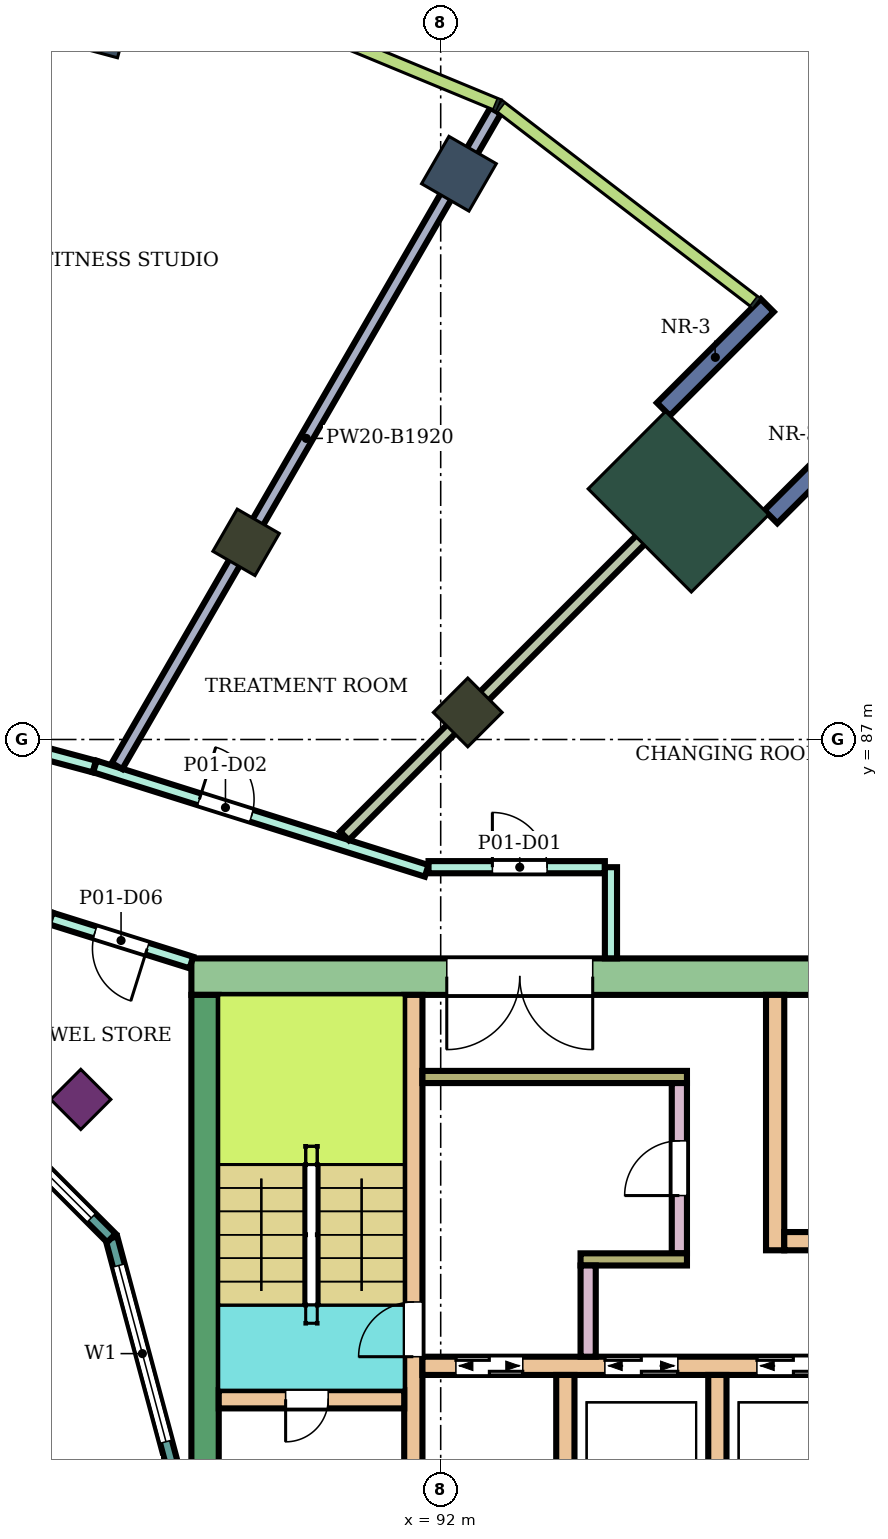
"""IFC4 building model, lengths in metres.
Left out: names, types, materials, properties, quantities, classifications, styles, units other than length and angle.
Written with IfcOpenShell. Run it as: python <this file> out.ifc"""

import sys

from ifc_helpers import new_model, si_unit, direction, frame, frame_2d, origin, origin_2d, place, context, subcontext, project, spatial, rectangle, extrude, element, fill, save


model = new_model("IFC4")
c1 = context("Model", 3, precision=1e-05, world=origin(), true_north=direction((0.0, 1.0)))
c2 = subcontext(c1, "Body", "Model", "MODEL_VIEW")
j1 = project(units=[si_unit("LENGTHUNIT", "METRE"), si_unit("PLANEANGLEUNIT", "RADIAN")], contexts=[c1])
p1 = place(None, origin())
s1 = spatial("IfcSite", under=j1, at=p1, CompositionType="ELEMENT")
p2 = place(p1, origin())
s2 = spatial("IfcBuilding", under=s1, at=p2, CompositionType="ELEMENT")
p3 = place(p2, frame((0.0, 0.0, 270.9)))
s3 = spatial("IfcBuildingStorey", under=s2, at=p3, CompositionType="ELEMENT", Elevation=270.9)
for number, where, z_axis, x_axis in (
    (1, (92.3, 96.304, 0.0), (0.0, 0.0, 1.0), (0.5, 0.866, 0.0)),
    (2, (86.367, 98.762, 0.0), (0.0, 0.0, 1.0), (0.259, 0.966, 0.0)),
):
    element("IfcColumn", number, at=place(p3, frame(where, z_axis=z_axis, x_axis=x_axis)), inside=s3, PredefinedType="COLUMN", context=c2, shape_type="SweptSolid", body=[
        extrude(rectangle(XDim=0.9, YDim=0.9, at=origin_2d()), origin(), (0.0, 0.0, 1.0), 4.8),
    ])
for number, where, z_axis, x_axis in (
    (3, (92.445, 87.445, 0.0), (0.0, 0.0, 1.0), (0.707, 0.707, 0.0)),
    (4, (88.8, 90.242, 0.0), (0.0, 0.0, 1.0), (0.5, 0.866, 0.0)),
):
    element("IfcColumn", number, at=place(p3, frame(where, z_axis=z_axis, x_axis=x_axis)), inside=s3, PredefinedType="COLUMN", context=c2, shape_type="SweptSolid", body=[
        extrude(rectangle(XDim=0.8, YDim=0.8, at=origin_2d()), origin(), (0.0, 0.0, 1.0), 4.8),
    ])
p4 = place(p3, frame((86.081, 81.081, 0.0), z_axis=(0.0, 0.0, 1.0), x_axis=(0.707106781187, 0.707106781187, 0.0)))
e5 = element("IfcColumn", 5, at=p4, inside=s3, PredefinedType="COLUMN", context=c2, shape_type="SweptSolid", body=[
    extrude(rectangle(XDim=0.7, YDim=0.7, at=origin_2d()), origin(), (0.0, 0.0, 1.0), 4.8),
])
p5 = place(p3, frame((95.91, 90.91, 0.0), z_axis=(0.0, 0.0, 1.0), x_axis=(0.707106781187, 0.707106781187, 0.0)))
e6 = element("IfcColumn", 6, at=p5, inside=s3, PredefinedType="COLUMN", context=c2, shape_type="SweptSolid", body=[
    extrude(rectangle(XDim=1.8, YDim=2.4, at=origin_2d()), origin(), (0.0, 0.0, 1.0), 4.8),
])
p6 = place(p3, frame((87.9, 83.1, 0.0), z_axis=(0.0, 0.0, 1.0), x_axis=(1.0, 0.0, 0.0)))
e7 = element("IfcWall", 7, at=p6, inside=s3, PredefinedType="SHEAR", context=c2, shape_type="SweptSolid", body=[
    extrude(rectangle(XDim=14.9, YDim=0.6, at=frame_2d((7.45, 0.0))), origin(), (0.0, 0.0, 1.0), 4.48),
])
p7 = place(p6, frame((4.2, 0.0, 0.0)))
e8 = element("IfcOpeningElement", 8, at=p7, cuts=e7, PredefinedType="OPENING", context=c2, shape_type="SweptSolid", body=[
    extrude(rectangle(XDim=2.4, YDim=2.4, at=frame_2d((1.2, 1.2))), frame((0.0, 0.31, 0.0), z_axis=(0.0, -1.0, 0.0), x_axis=(1.0, 0.0, 0.0)), (0.0, 0.0, 1.0), 0.62),
])
p8 = place(p3, frame((88.125, 75.0, 0.0), z_axis=(0.0, 0.0, 1.0), x_axis=(0.0, 1.0, 0.0)))
e9 = element("IfcWall", 9, at=p8, inside=s3, PredefinedType="SHEAR", context=c2, shape_type="SweptSolid", body=[
    extrude(rectangle(XDim=7.8, YDim=0.45, at=frame_2d((3.9, 0.0))), origin(), (0.0, 0.0, 1.0), 4.48),
])
p9 = place(p3, frame((91.55, 75.0, 0.0), z_axis=(0.0, 0.0, 1.0), x_axis=(0.0, 1.0, 0.0)))
e10 = element("IfcWall", 10, at=p9, inside=s3, PredefinedType="SHEAR", context=c2, shape_type="SweptSolid", body=[
    extrude(rectangle(XDim=7.8, YDim=0.3, at=frame_2d((3.9, 0.0))), origin(), (0.0, 0.0, 1.0), 4.48),
])
p10 = place(p9, frame((1.85, 0.0, 0.0)))
e11 = element("IfcOpeningElement", 11, at=p10, cuts=e10, PredefinedType="OPENING", context=c2, shape_type="SweptSolid", body=[
    extrude(rectangle(XDim=0.9, YDim=2.1, at=frame_2d((0.45, 1.05))), frame((0.0, 0.16, 0.0), z_axis=(0.0, -1.0, 0.0), x_axis=(1.0, 0.0, 0.0)), (0.0, 0.0, 1.0), 0.32),
])
p11 = place(p3, frame((88.35, 76.15, 0.0), z_axis=(0.0, 0.0, 1.0), x_axis=(1.0, 0.0, 0.0)))
e12 = element("IfcWall", 12, at=p11, inside=s3, PredefinedType="SHEAR", context=c2, shape_type="SweptSolid", body=[
    extrude(rectangle(XDim=3.05, YDim=0.3, at=frame_2d((1.525, 0.0))), origin(), (0.0, 0.0, 1.0), 4.48),
])
p12 = place(p11, frame((1.1, 0.0, 0.0)))
e13 = element("IfcOpeningElement", 13, at=p12, cuts=e12, PredefinedType="OPENING", context=c2, shape_type="SweptSolid", body=[
    extrude(rectangle(XDim=0.7, YDim=2.0, at=frame_2d((0.35, 1.0))), frame((0.0, 0.16, 0.0), z_axis=(0.0, -1.0, 0.0), x_axis=(1.0, 0.0, 0.0)), (0.0, 0.0, 1.0), 0.32),
])
p13 = place(p3, frame((91.7, 76.7, 0.0), z_axis=(0.0, 0.0, 1.0), x_axis=(1.0, 0.0, 0.0)))
e14 = element("IfcWall", 14, at=p13, inside=s3, PredefinedType="SHEAR", context=c2, shape_type="SweptSolid", body=[
    extrude(rectangle(XDim=11.1, YDim=0.3, at=frame_2d((5.55, 0.0))), origin(), (0.0, 0.0, 1.0), 4.48),
])
p14 = place(p13, frame((0.55, 0.0, 0.0)))
e15 = element("IfcOpeningElement", 15, at=p14, cuts=e14, PredefinedType="OPENING", context=c2, shape_type="SweptSolid", body=[
    extrude(rectangle(XDim=1.1, YDim=2.1, at=frame_2d((0.55, 1.05))), frame((0.0, 0.16, 0.0), z_axis=(0.0, -1.0, 0.0), x_axis=(1.0, 0.0, 0.0)), (0.0, 0.0, 1.0), 0.32),
])
p15 = place(p13, frame((3.0, 0.0, 0.0)))
e16 = element("IfcOpeningElement", 16, at=p15, cuts=e14, PredefinedType="OPENING", context=c2, shape_type="SweptSolid", body=[
    extrude(rectangle(XDim=1.2, YDim=2.1, at=frame_2d((0.6, 1.05))), frame((0.0, 0.16, 0.0), z_axis=(0.0, -1.0, 0.0), x_axis=(1.0, 0.0, 0.0)), (0.0, 0.0, 1.0), 0.32),
])
p16 = place(p13, frame((5.5, 0.0, 0.0)))
e17 = element("IfcOpeningElement", 17, at=p16, cuts=e14, PredefinedType="OPENING", context=c2, shape_type="SweptSolid", body=[
    extrude(rectangle(XDim=1.2, YDim=2.1, at=frame_2d((0.6, 1.05))), frame((0.0, 0.16, 0.0), z_axis=(0.0, -1.0, 0.0), x_axis=(1.0, 0.0, 0.0)), (0.0, 0.0, 1.0), 0.32),
])
p17 = place(p13, frame((8.85, 0.0, 0.0)))
e18 = element("IfcOpeningElement", 18, at=p17, cuts=e14, PredefinedType="OPENING", context=c2, shape_type="SweptSolid", body=[
    extrude(rectangle(XDim=0.9, YDim=2.1, at=frame_2d((0.45, 1.05))), frame((0.0, 0.16, 0.0), z_axis=(0.0, -1.0, 0.0), x_axis=(1.0, 0.0, 0.0)), (0.0, 0.0, 1.0), 0.32),
])
for number, where, z_axis, x_axis in (
    (19, (94.05, 74.0, 0.0), (0.0, 0.0, 1.0), (0.0, 1.0, 0.0)),
    (20, (96.55, 74.0, 0.0), (0.0, 0.0, 1.0), (0.0, 1.0, 0.0)),
):
    element("IfcWall", number, at=place(p3, frame(where, z_axis=z_axis, x_axis=x_axis)), inside=s3, PredefinedType="SHEAR", context=c2, shape_type="SweptSolid", body=[
        extrude(rectangle(XDim=2.55, YDim=0.3, at=frame_2d((1.275, 0.0))), origin(), (0.0, 0.0, 1.0), 4.48),
    ])
p18 = place(p3, frame((91.7, 81.45, 0.0), z_axis=(0.0, 0.0, 1.0), x_axis=(1.0, 0.0, 0.0)))
e21 = element("IfcWall", 21, at=p18, inside=s3, PredefinedType="SHEAR", context=c2, shape_type="SweptSolid", body=[
    extrude(rectangle(XDim=4.35, YDim=0.2, at=frame_2d((2.175, 0.0))), origin(), (0.0, 0.0, 1.0), 4.48),
])
p19 = place(p3, frame((95.925, 78.55, 0.0), z_axis=(0.0, 0.0, 1.0), x_axis=(0.0, 1.0, 0.0)))
e22 = element("IfcWall", 22, at=p19, inside=s3, PredefinedType="SHEAR", context=c2, shape_type="SweptSolid", body=[
    extrude(rectangle(XDim=2.8, YDim=0.25, at=frame_2d((1.4, 0.0))), origin(), (0.0, 0.0, 1.0), 4.48),
])
p20 = place(p19, frame((0.95, 0.0, 0.0)))
e23 = element("IfcOpeningElement", 23, at=p20, cuts=e22, PredefinedType="OPENING", context=c2, shape_type="SweptSolid", body=[
    extrude(rectangle(XDim=0.9, YDim=2.1, at=frame_2d((0.45, 1.05))), frame((0.0, 0.135, 0.0), z_axis=(0.0, -1.0, 0.0), x_axis=(1.0, 0.0, 0.0)), (0.0, 0.0, 1.0), 0.27),
])
p21 = place(p3, frame((94.3, 78.45, 0.0), z_axis=(0.0, 0.0, 1.0), x_axis=(1.0, 0.0, 0.0)))
e24 = element("IfcWall", 24, at=p21, inside=s3, PredefinedType="SHEAR", context=c2, shape_type="SweptSolid", body=[
    extrude(rectangle(XDim=1.75, YDim=0.2, at=frame_2d((0.875, 0.0))), origin(), (0.0, 0.0, 1.0), 4.48),
])
p22 = place(p3, frame((94.425, 76.85, 0.0), z_axis=(0.0, 0.0, 1.0), x_axis=(0.0, 1.0, 0.0)))
e25 = element("IfcWall", 25, at=p22, inside=s3, PredefinedType="SHEAR", context=c2, shape_type="SweptSolid", body=[
    extrude(rectangle(XDim=1.5, YDim=0.25, at=frame_2d((0.75, 0.0))), origin(), (0.0, 0.0, 1.0), 4.48),
])
p23 = place(p3, frame((97.5, 78.6, 0.0), z_axis=(0.0, 0.0, 1.0), x_axis=(0.0, 1.0, 0.0)))
e26 = element("IfcWall", 26, at=p23, inside=s3, PredefinedType="SHEAR", context=c2, shape_type="SweptSolid", body=[
    extrude(rectangle(XDim=4.2, YDim=0.3, at=frame_2d((2.1, 0.0))), origin(), (0.0, 0.0, 1.0), 4.48),
])
p24 = place(p3, frame((97.65, 78.75, 0.0), z_axis=(0.0, 0.0, 1.0), x_axis=(1.0, 0.0, 0.0)))
e27 = element("IfcWall", 27, at=p24, inside=s3, PredefinedType="SHEAR", context=c2, shape_type="SweptSolid", body=[
    extrude(rectangle(XDim=5.15, YDim=0.3, at=frame_2d((2.575, 0.0))), origin(), (0.0, 0.0, 1.0), 4.48),
])
p25 = place(p24, frame((0.58, 0.0, 0.0)))
e28 = element("IfcOpeningElement", 28, at=p25, cuts=e27, PredefinedType="OPENING", context=c2, shape_type="SweptSolid", body=[
    extrude(rectangle(XDim=0.9, YDim=2.1, at=frame_2d((0.45, 1.05))), frame((0.0, 0.16, 0.0), z_axis=(0.0, -1.0, 0.0), x_axis=(1.0, 0.0, 0.0)), (0.0, 0.0, 1.0), 0.32),
])
p26 = place(p24, frame((2.383, 0.0, 0.0)))
e29 = element("IfcOpeningElement", 29, at=p26, cuts=e27, PredefinedType="OPENING", context=c2, shape_type="SweptSolid", body=[
    extrude(rectangle(XDim=0.9, YDim=2.1, at=frame_2d((0.45, 1.05))), frame((0.0, 0.16, 0.0), z_axis=(0.0, -1.0, 0.0), x_axis=(1.0, 0.0, 0.0)), (0.0, 0.0, 1.0), 0.32),
])
p27 = place(p24, frame((3.927, 0.0, 0.0)))
e30 = element("IfcOpeningElement", 30, at=p27, cuts=e27, PredefinedType="OPENING", context=c2, shape_type="SweptSolid", body=[
    extrude(rectangle(XDim=0.9, YDim=2.1, at=frame_2d((0.45, 1.05))), frame((0.0, 0.16, 0.0), z_axis=(0.0, -1.0, 0.0), x_axis=(1.0, 0.0, 0.0)), (0.0, 0.0, 1.0), 0.32),
])
for number, where, z_axis, x_axis in (
    (31, (97.43, 90.662, 0.0), (0.0, 0.0, 1.0), (0.707, 0.707, 0.0)),
    (32, (95.662, 92.43, 0.0), (0.0, 0.0, 1.0), (0.707, 0.707, 0.0)),
):
    element("IfcWall", number, at=place(p3, frame(where, z_axis=z_axis, x_axis=x_axis)), inside=s3, PredefinedType="NOTDEFINED", context=c2, shape_type="SweptSolid", body=[
        extrude(rectangle(XDim=2.416, YDim=0.3, at=frame_2d((1.208, 0.0))), origin(), (0.0, 0.0, 1.0), 4.8),
    ])
p28 = place(p3, frame((87.604, 75.0, 0.0), z_axis=(0.0, 0.0, 1.0), x_axis=(-0.258789828301, 0.965933654434, 0.0)))
e33 = element("IfcWall", 33, at=p28, inside=s3, PredefinedType="NOTDEFINED", context=c2, shape_type="SweptSolid", body=[
    extrude(rectangle(XDim=3.936, YDim=0.2, at=frame_2d((1.968, 0.0))), origin(), (0.0, 0.0, 1.0), 4.8),
])
p29 = place(p28, frame((0.468, 0.0, 0.9)))
e34 = element("IfcOpeningElement", 34, at=p29, cuts=e33, PredefinedType="OPENING", context=c2, shape_type="SweptSolid", body=[
    extrude(rectangle(XDim=3.0, YDim=2.3, at=frame_2d((1.5, 1.15))), frame((0.0, 0.11, 0.0), z_axis=(0.0, -1.0, 0.0), x_axis=(1.0, 0.0, 0.0)), (0.0, 0.0, 1.0), 0.22),
])
p30 = place(p3, frame((86.585, 78.802, 0.0), z_axis=(0.0, 0.0, 1.0), x_axis=(-0.707106781187, 0.707106781187, 0.0)))
e35 = element("IfcWall", 35, at=p30, inside=s3, PredefinedType="NOTDEFINED", context=c2, shape_type="SweptSolid", body=[
    extrude(rectangle(XDim=3.936, YDim=0.2, at=frame_2d((1.968, 0.0))), origin(), (0.0, 0.0, 1.0), 4.8),
])
p31 = place(p30, frame((0.468, 0.0, 0.9)))
e36 = element("IfcOpeningElement", 36, at=p31, cuts=e35, PredefinedType="OPENING", context=c2, shape_type="SweptSolid", body=[
    extrude(rectangle(XDim=3.0, YDim=2.3, at=frame_2d((1.5, 1.15))), frame((0.0, 0.11, 0.0), z_axis=(0.0, -1.0, 0.0), x_axis=(1.0, 0.0, 0.0)), (0.0, 0.0, 1.0), 0.22),
])
p32 = place(p3, frame((80.0, 88.246, 0.0), z_axis=(0.0, 0.0, 1.0), x_axis=(0.965856994925, -0.259075790752, 0.0)))
e37 = element("IfcWall", 37, at=p32, inside=s3, PredefinedType="PARTITIONING", context=c2, shape_type="SweptSolid", body=[
    extrude(rectangle(XDim=6.526, YDim=0.2, at=frame_2d((3.263, 0.0))), origin(), (0.0, 0.0, 1.0), 4.35),
])
p33 = place(p32, frame((2.368, 0.0, 0.0)))
e38 = element("IfcOpeningElement", 38, at=p33, cuts=e37, PredefinedType="OPENING", context=c2, shape_type="SweptSolid", body=[
    extrude(rectangle(XDim=1.8, YDim=2.1, at=frame_2d((0.9, 1.05))), frame((0.0, 0.11, 0.0), z_axis=(0.0, -1.0, 0.0), x_axis=(1.0, 0.0, 0.0)), (0.0, 0.0, 1.0), 0.22),
])
p34 = place(p3, frame((85.587, 84.057, 0.0), z_axis=(0.0, 0.0, 1.0), x_axis=(0.954239513179, -0.299043393987, 0.0)))
e39 = element("IfcWall", 39, at=p34, inside=s3, PredefinedType="PARTITIONING", context=c2, shape_type="SweptSolid", body=[
    extrude(rectangle(XDim=2.424, YDim=0.2, at=frame_2d((1.212, 0.0))), origin(), (0.0, 0.0, 1.0), 4.35),
])
p35 = place(p34, frame((0.762, 0.0, 0.0)))
e40 = element("IfcOpeningElement", 40, at=p35, cuts=e39, PredefinedType="OPENING", context=c2, shape_type="SweptSolid", body=[
    extrude(rectangle(XDim=0.9, YDim=2.1, at=frame_2d((0.45, 1.05))), frame((0.0, 0.11, 0.0), z_axis=(0.0, -1.0, 0.0), x_axis=(1.0, 0.0, 0.0)), (0.0, 0.0, 1.0), 0.22),
])
p36 = place(p3, frame((86.314, 86.556, 0.0), z_axis=(0.0, 0.0, 1.0), x_axis=(0.953912400139, -0.300085209334, 0.0)))
e41 = element("IfcWall", 41, at=p36, inside=s3, PredefinedType="PARTITIONING", context=c2, shape_type="SweptSolid", body=[
    extrude(rectangle(XDim=5.719, YDim=0.2, at=frame_2d((2.86, 0.0))), origin(), (0.0, 0.0, 1.0), 4.35),
])
p37 = place(p36, frame((1.801, 0.0, 0.0)))
e42 = element("IfcOpeningElement", 42, at=p37, cuts=e41, PredefinedType="OPENING", context=c2, shape_type="SweptSolid", body=[
    extrude(rectangle(XDim=0.9, YDim=2.1, at=frame_2d((0.45, 1.05))), frame((0.0, 0.11, 0.0), z_axis=(0.0, -1.0, 0.0), x_axis=(1.0, 0.0, 0.0)), (0.0, 0.0, 1.0), 0.22),
])
p38 = place(p3, frame((86.677, 86.563, 0.0), z_axis=(0.0, 0.0, 1.0), x_axis=(0.500143584568, 0.865942489324, 0.0)))
e43 = element("IfcWall", 43, at=p38, inside=s3, PredefinedType="PARTITIONING", context=c2, shape_type="SweptSolid", body=[
    extrude(rectangle(XDim=12.445, YDim=0.2, at=frame_2d((6.222, 0.0))), origin(), (0.0, 0.0, 1.0), 2.88),
])
p39 = place(p3, frame((90.417, 85.415, 0.0), z_axis=(0.0, 0.0, 1.0), x_axis=(0.707164431244, 0.707049126429, 0.0)))
e44 = element("IfcWall", 44, at=p39, inside=s3, PredefinedType="PARTITIONING", context=c2, shape_type="SweptSolid", body=[
    extrude(rectangle(XDim=8.469, YDim=0.2, at=frame_2d((4.235, 0.0))), origin(), (0.0, 0.0, 1.0), 3.08),
])
p40 = place(p3, frame((91.8, 84.9, 0.0), z_axis=(0.0, 0.0, 1.0), x_axis=(1.0, 0.0, 0.0)))
e45 = element("IfcWall", 45, at=p40, inside=s3, PredefinedType="PARTITIONING", context=c2, shape_type="SweptSolid", body=[
    extrude(rectangle(XDim=2.9, YDim=0.2, at=frame_2d((1.45, 0.0))), origin(), (0.0, 0.0, 1.0), 4.35),
])
p41 = place(p40, frame((1.05, 0.0, 0.0)))
e46 = element("IfcOpeningElement", 46, at=p41, cuts=e45, PredefinedType="OPENING", context=c2, shape_type="SweptSolid", body=[
    extrude(rectangle(XDim=0.9, YDim=2.1, at=frame_2d((0.45, 1.05))), frame((0.0, 0.11, 0.0), z_axis=(0.0, -1.0, 0.0), x_axis=(1.0, 0.0, 0.0)), (0.0, 0.0, 1.0), 0.22),
])
p42 = place(p3, frame((94.8, 83.401, 0.0), z_axis=(0.0, 0.0, 1.0), x_axis=(0.0, 1.0, 0.0)))
e47 = element("IfcWall", 47, at=p42, inside=s3, PredefinedType="PARTITIONING", context=c2, shape_type="SweptSolid", body=[
    extrude(rectangle(XDim=1.499, YDim=0.2, at=frame_2d((0.75, 0.0))), origin(), (0.0, 0.0, 1.0), 4.35),
])
p43 = place(p29, origin())
e48 = element("IfcWindow", 48, at=p43, inside=s3, PartitioningType="SINGLE_PANEL", PredefinedType="WINDOW", context=c2, shape_type="SweptSolid", body=[
    extrude(rectangle(XDim=3.0, YDim=2.3, at=frame_2d((1.5, 1.15))), frame((0.0, 0.03, 0.0), z_axis=(0.0, -1.0, 0.0), x_axis=(1.0, 0.0, 0.0)), (0.0, 0.0, 1.0), 0.06),
])
fill(e34, e48)
p44 = place(p31, origin())
e49 = element("IfcWindow", 49, at=p44, inside=s3, PartitioningType="SINGLE_PANEL", PredefinedType="WINDOW", context=c2, shape_type="SweptSolid", body=[
    extrude(rectangle(XDim=3.0, YDim=2.3, at=frame_2d((1.5, 1.15))), frame((0.0, 0.03, 0.0), z_axis=(0.0, -1.0, 0.0), x_axis=(1.0, 0.0, 0.0)), (0.0, 0.0, 1.0), 0.06),
])
fill(e36, e49)
p45 = place(p41, origin())
e50 = element("IfcDoor", 50, at=p45, inside=s3, OperationType="SINGLE_SWING_LEFT", PredefinedType="DOOR", context=c2, shape_type="SweptSolid", body=[
    extrude(rectangle(XDim=0.9, YDim=2.1, at=frame_2d((0.45, 1.05))), frame((0.0, 0.025, 0.0), z_axis=(0.0, -1.0, 0.0), x_axis=(1.0, 0.0, 0.0)), (0.0, 0.0, 1.0), 0.05),
])
fill(e46, e50)
p46 = place(p37, origin())
e51 = element("IfcDoor", 51, at=p46, inside=s3, OperationType="SINGLE_SWING_LEFT", PredefinedType="DOOR", context=c2, shape_type="SweptSolid", body=[
    extrude(rectangle(XDim=0.9, YDim=2.1, at=frame_2d((0.45, 1.05))), frame((0.0, 0.025, 0.0), z_axis=(0.0, -1.0, 0.0), x_axis=(1.0, 0.0, 0.0)), (0.0, 0.0, 1.0), 0.05),
])
fill(e42, e51)
p47 = place(p35, frame((0.9, 0.0, 0.0), z_axis=(0.0, 0.0, 1.0), x_axis=(-1.0, 0.0, 0.0)))
e52 = element("IfcDoor", 52, at=p47, inside=s3, OperationType="SINGLE_SWING_LEFT", PredefinedType="DOOR", context=c2, shape_type="SweptSolid", body=[
    extrude(rectangle(XDim=0.9, YDim=2.1, at=frame_2d((0.45, 1.05))), frame((0.0, 0.025, 0.0), z_axis=(0.0, -1.0, 0.0), x_axis=(1.0, 0.0, 0.0)), (0.0, 0.0, 1.0), 0.05),
])
fill(e40, e52)
p48 = place(p12, frame((0.7, 0.0, 0.0), z_axis=(0.0, 0.0, 1.0), x_axis=(-1.0, 0.0, 0.0)))
e53 = element("IfcDoor", 53, at=p48, inside=s3, OperationType="SINGLE_SWING_RIGHT", PredefinedType="DOOR", context=c2, shape_type="SweptSolid", body=[
    extrude(rectangle(XDim=0.7, YDim=2.0, at=frame_2d((0.35, 1.0))), frame((0.0, 0.025, 0.0), z_axis=(0.0, -1.0, 0.0), x_axis=(1.0, 0.0, 0.0)), (0.0, 0.0, 1.0), 0.05),
])
fill(e13, e53)
p49 = place(p10, origin())
e54 = element("IfcDoor", 54, at=p49, inside=s3, OperationType="SINGLE_SWING_LEFT", PredefinedType="DOOR", context=c2, shape_type="SweptSolid", body=[
    extrude(rectangle(XDim=0.9, YDim=2.1, at=frame_2d((0.45, 1.05))), frame((0.0, 0.025, 0.0), z_axis=(0.0, -1.0, 0.0), x_axis=(1.0, 0.0, 0.0)), (0.0, 0.0, 1.0), 0.05),
])
fill(e11, e54)
p50 = place(p14, origin())
e55 = element("IfcDoor", 55, at=p50, inside=s3, OperationType="DOUBLE_DOOR_SLIDING", PredefinedType="DOOR", context=c2, shape_type="SweptSolid", body=[
    extrude(rectangle(XDim=1.1, YDim=2.1, at=frame_2d((0.55, 1.05))), frame((0.0, 0.025, 0.0), z_axis=(0.0, -1.0, 0.0), x_axis=(1.0, 0.0, 0.0)), (0.0, 0.0, 1.0), 0.05),
])
fill(e15, e55)
p51 = place(p15, origin())
e56 = element("IfcDoor", 56, at=p51, inside=s3, OperationType="DOUBLE_DOOR_SLIDING", PredefinedType="DOOR", context=c2, shape_type="SweptSolid", body=[
    extrude(rectangle(XDim=1.2, YDim=2.1, at=frame_2d((0.6, 1.05))), frame((0.0, 0.025, 0.0), z_axis=(0.0, -1.0, 0.0), x_axis=(1.0, 0.0, 0.0)), (0.0, 0.0, 1.0), 0.05),
])
fill(e16, e56)
p52 = place(p16, origin())
e57 = element("IfcDoor", 57, at=p52, inside=s3, OperationType="DOUBLE_DOOR_SLIDING", PredefinedType="DOOR", context=c2, shape_type="SweptSolid", body=[
    extrude(rectangle(XDim=1.2, YDim=2.1, at=frame_2d((0.6, 1.05))), frame((0.0, 0.025, 0.0), z_axis=(0.0, -1.0, 0.0), x_axis=(1.0, 0.0, 0.0)), (0.0, 0.0, 1.0), 0.05),
])
fill(e17, e57)
p53 = place(p20, origin())
e58 = element("IfcDoor", 58, at=p53, inside=s3, OperationType="SINGLE_SWING_LEFT", PredefinedType="DOOR", context=c2, shape_type="SweptSolid", body=[
    extrude(rectangle(XDim=0.9, YDim=2.1, at=frame_2d((0.45, 1.05))), frame((0.0, 0.025, 0.0), z_axis=(0.0, -1.0, 0.0), x_axis=(1.0, 0.0, 0.0)), (0.0, 0.0, 1.0), 0.05),
])
fill(e23, e58)
p54 = place(p7, frame((2.4, 0.0, 0.0), z_axis=(0.0, 0.0, 1.0), x_axis=(-1.0, 0.0, 0.0)))
e59 = element("IfcDoor", 59, at=p54, inside=s3, OperationType="DOUBLE_DOOR_SINGLE_SWING", PredefinedType="DOOR", context=c2, shape_type="SweptSolid", body=[
    extrude(rectangle(XDim=2.4, YDim=2.4, at=frame_2d((1.2, 1.2))), frame((0.0, 0.025, 0.0), z_axis=(0.0, -1.0, 0.0), x_axis=(1.0, 0.0, 0.0)), (0.0, 0.0, 1.0), 0.05),
])
fill(e8, e59)
save(model, sys.argv[1])
